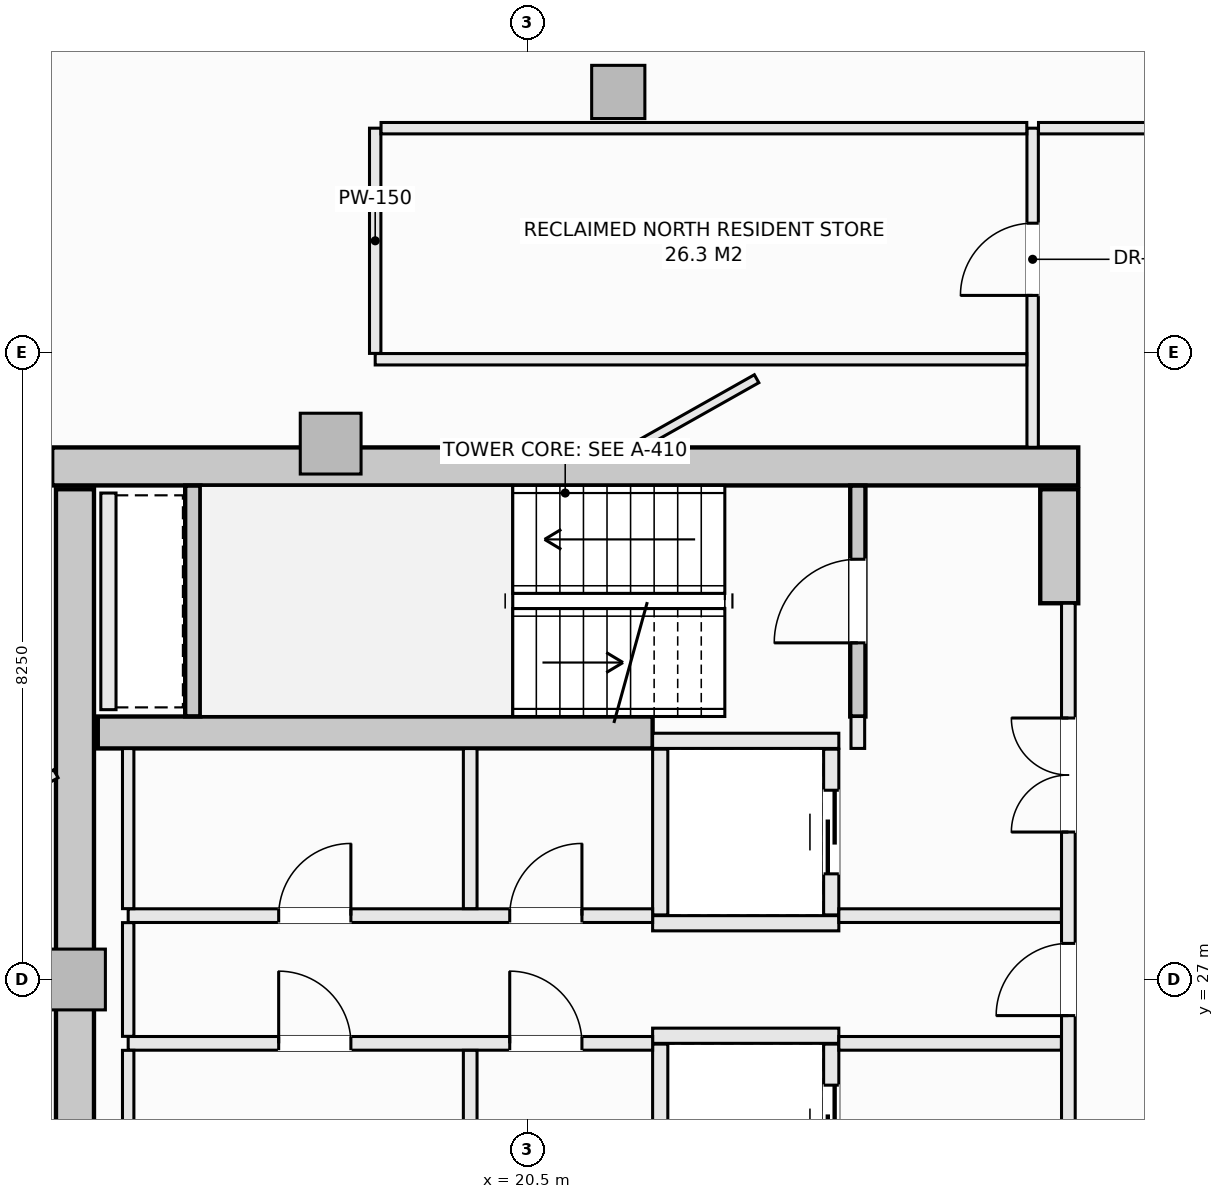
"""IFC4 building model, lengths in metres.
Left out: names, types, materials, properties, quantities, classifications, styles, units other than length and angle.
Written with IfcOpenShell. Run it as: python <this file> out.ifc"""

import sys

from ifc_helpers import new_model, si_unit, direction, frame, frame_2d, origin, origin_2d, place, context, subcontext, project, spatial, rectangle, extrude, element, fill, save


model = new_model("IFC4")
c1 = context("Model", 3, precision=1e-05, world=origin(), true_north=direction((0.0, 1.0)))
c2 = subcontext(c1, "Body", "Model", "MODEL_VIEW")
j1 = project(units=[si_unit("LENGTHUNIT", "METRE"), si_unit("PLANEANGLEUNIT", "RADIAN")], contexts=[c1])
p1 = place(None, origin())
s1 = spatial("IfcSite", under=j1, at=p1, CompositionType="ELEMENT")
p2 = place(p1, origin())
s2 = spatial("IfcBuilding", under=s1, at=p2, CompositionType="ELEMENT")
p3 = place(p2, frame((0.0, 0.0, 196.4)))
s3 = spatial("IfcBuildingStorey", under=s2, at=p3, CompositionType="ELEMENT", Elevation=196.4)
p4 = place(p3, frame((14.25, 33.75, -0.27), z_axis=(0.0, 0.0, 1.0), x_axis=(1.0, 0.0, 0.0)))
e1 = element("IfcWall", 1, at=p4, inside=s3, PredefinedType="SHEAR", context=c2, shape_type="SweptSolid", body=[
    extrude(rectangle(XDim=13.5, YDim=0.5, at=frame_2d((6.75, 0.0))), origin(), (0.0, 0.0, 1.0), 3.3),
])
p5 = place(p3, frame((14.55, 20.55, -0.27), z_axis=(0.0, 0.0, 1.0), x_axis=(0.0, 1.0, 0.0)))
e2 = element("IfcWall", 2, at=p5, inside=s3, PredefinedType="SHEAR", context=c2, shape_type="SweptSolid", body=[
    extrude(rectangle(XDim=12.9, YDim=0.5, at=frame_2d((6.45, 0.0))), origin(), (0.0, 0.0, 1.0), 3.3),
])
p6 = place(p3, frame((27.5, 31.95, -0.27), z_axis=(0.0, 0.0, 1.0), x_axis=(0.0, 1.0, 0.0)))
e3 = element("IfcWall", 3, at=p6, inside=s3, PredefinedType="SHEAR", context=c2, shape_type="SweptSolid", body=[
    extrude(rectangle(XDim=1.5, YDim=0.5, at=frame_2d((0.75, 0.0))), origin(), (0.0, 0.0, 1.0), 3.3),
])
p7 = place(p3, frame((14.85, 30.25, -0.27), z_axis=(0.0, 0.0, 1.0), x_axis=(1.0, 0.0, 0.0)))
e4 = element("IfcWall", 4, at=p7, inside=s3, PredefinedType="SHEAR", context=c2, shape_type="SweptSolid", body=[
    extrude(rectangle(XDim=7.3, YDim=0.42, at=frame_2d((3.65, 0.0))), origin(), (0.0, 0.0, 1.0), 3.3),
])
p8 = place(p3, frame((21.698, 38.677, -0.27), z_axis=(0.0, 0.0, 1.0), x_axis=(1.0, 0.0, 0.0)))
e5 = element("IfcColumn", 5, at=p8, inside=s3, PredefinedType="COLUMN", context=c2, shape_type="SweptSolid", body=[
    extrude(rectangle(XDim=0.7, YDim=0.7, at=origin_2d()), origin(), (0.0, 0.0, 1.0), 3.3),
])
for number, where, z_axis, x_axis in (
    (6, (17.914, 34.05, -0.27), (0.0, 0.0, 1.0), (1.0, 0.0, 0.0)),
    (7, (14.55, 27.0, -0.27), (0.0, 0.0, 1.0), (1.0, 0.0, 0.0)),
):
    element("IfcColumn", number, at=place(p3, frame(where, z_axis=z_axis, x_axis=x_axis)), inside=s3, PredefinedType="PILASTER", context=c2, shape_type="SweptSolid", body=[
        extrude(rectangle(XDim=0.8, YDim=0.8, at=origin_2d()), origin(), (0.0, 0.0, 1.0), 3.3),
    ])
p9 = place(p3, frame((24.85, 30.46, -0.27), z_axis=(0.0, 0.0, 1.0), x_axis=(0.0, 1.0, 0.0)))
e8 = element("IfcWall", 8, at=p9, inside=s3, PredefinedType="SHEAR", context=c2, shape_type="SweptSolid", body=[
    extrude(rectangle(XDim=3.038, YDim=0.2, at=frame_2d((1.519, 0.0))), origin(), (0.0, 0.0, 1.0), 3.3),
])
p10 = place(p9, frame((0.969, 0.0, 0.27)))
e9 = element("IfcOpeningElement", 9, at=p10, cuts=e8, PredefinedType="OPENING", context=c2, shape_type="SweptSolid", body=[
    extrude(rectangle(XDim=1.1, YDim=2.15, at=frame_2d((0.55, 1.075))), frame((0.0, 0.11, 0.0), z_axis=(0.0, -1.0, 0.0), x_axis=(1.0, 0.0, 0.0)), (0.0, 0.0, 1.0), 0.22),
])
p11 = place(p3, frame((16.1, 30.462, -0.27), z_axis=(0.0, 0.0, 1.0), x_axis=(0.0, 1.0, 0.0)))
e10 = element("IfcWall", 10, at=p11, inside=s3, PredefinedType="SHEAR", context=c2, shape_type="SweptSolid", body=[
    extrude(rectangle(XDim=3.036, YDim=0.2, at=frame_2d((1.518, 0.0))), origin(), (0.0, 0.0, 1.0), 3.3),
])
for number, where, z_axis, x_axis in (
    (11, (22.15, 30.14, 0.0), (0.0, 0.0, 1.0), (1.0, 0.0, 0.0)),
    (12, (22.15, 27.74, 0.0), (0.0, 0.0, 1.0), (1.0, 0.0, 0.0)),
):
    element("IfcWall", number, at=place(p3, frame(where, z_axis=z_axis, x_axis=x_axis)), inside=s3, PredefinedType="SOLIDWALL", context=c2, shape_type="SweptSolid", body=[
        extrude(rectangle(XDim=2.45, YDim=0.2, at=frame_2d((1.225, 0.0))), origin(), (0.0, 0.0, 1.0), 3.03),
    ])
p12 = place(p3, frame((22.25, 27.85, 0.0), z_axis=(0.0, 0.0, 1.0), x_axis=(0.0, 1.0, 0.0)))
e13 = element("IfcWall", 13, at=p12, inside=s3, PredefinedType="SOLIDWALL", context=c2, shape_type="SweptSolid", body=[
    extrude(rectangle(XDim=2.18, YDim=0.2, at=frame_2d((1.09, 0.0))), origin(), (0.0, 0.0, 1.0), 3.03),
])
p13 = place(p3, frame((24.5, 27.85, 0.0), z_axis=(0.0, 0.0, 1.0), x_axis=(0.0, 1.0, 0.0)))
e14 = element("IfcWall", 14, at=p13, inside=s3, PredefinedType="SOLIDWALL", context=c2, shape_type="SweptSolid", body=[
    extrude(rectangle(XDim=2.18, YDim=0.2, at=frame_2d((1.09, 0.0))), origin(), (0.0, 0.0, 1.0), 3.03),
])
p14 = place(p13, frame((0.54, 0.0, 0.0)))
e15 = element("IfcOpeningElement", 15, at=p14, cuts=e14, PredefinedType="OPENING", context=c2, shape_type="SweptSolid", body=[
    extrude(rectangle(XDim=1.1, YDim=2.2, at=frame_2d((0.55, 1.1))), frame((0.0, 0.11, 0.0), z_axis=(0.0, -1.0, 0.0), x_axis=(1.0, 0.0, 0.0)), (0.0, 0.0, 1.0), 0.22),
])
p15 = place(p3, frame((22.15, 26.26, 0.0), z_axis=(0.0, 0.0, 1.0), x_axis=(1.0, 0.0, 0.0)))
e16 = element("IfcWall", 16, at=p15, inside=s3, PredefinedType="SOLIDWALL", context=c2, shape_type="SweptSolid", body=[
    extrude(rectangle(XDim=2.45, YDim=0.2, at=frame_2d((1.225, 0.0))), origin(), (0.0, 0.0, 1.0), 3.03),
])
p16 = place(p3, frame((22.25, 23.97, 0.0), z_axis=(0.0, 0.0, 1.0), x_axis=(0.0, 1.0, 0.0)))
e17 = element("IfcWall", 17, at=p16, inside=s3, PredefinedType="SOLIDWALL", context=c2, shape_type="SweptSolid", body=[
    extrude(rectangle(XDim=2.18, YDim=0.2, at=frame_2d((1.09, 0.0))), origin(), (0.0, 0.0, 1.0), 3.03),
])
p17 = place(p3, frame((24.5, 23.97, 0.0), z_axis=(0.0, 0.0, 1.0), x_axis=(0.0, 1.0, 0.0)))
e18 = element("IfcWall", 18, at=p17, inside=s3, PredefinedType="SOLIDWALL", context=c2, shape_type="SweptSolid", body=[
    extrude(rectangle(XDim=2.18, YDim=0.2, at=frame_2d((1.09, 0.0))), origin(), (0.0, 0.0, 1.0), 3.03),
])
p18 = place(p17, frame((0.54, 0.0, 0.0)))
e19 = element("IfcOpeningElement", 19, at=p18, cuts=e18, PredefinedType="OPENING", context=c2, shape_type="SweptSolid", body=[
    extrude(rectangle(XDim=1.1, YDim=2.2, at=frame_2d((0.55, 1.1))), frame((0.0, 0.11, 0.0), z_axis=(0.0, -1.0, 0.0), x_axis=(1.0, 0.0, 0.0)), (0.0, 0.0, 1.0), 0.22),
])
p19 = place(p3, frame((14.99, 30.55, 0.0), z_axis=(0.0, 0.0, 1.0), x_axis=(0.0, 1.0, 0.0)))
e20 = element("IfcWall", 20, at=p19, inside=s3, PredefinedType="SOLIDWALL", context=c2, shape_type="SweptSolid", body=[
    extrude(rectangle(XDim=2.85, YDim=0.2, at=frame_2d((1.425, 0.0))), origin(), (0.0, 0.0, 1.0), 3.03),
])
p20 = place(p3, frame((24.85, 30.04, 0.0), z_axis=(0.0, 0.0, 1.0), x_axis=(0.0, 1.0, 0.0)))
e21 = element("IfcWall", 21, at=p20, inside=s3, PredefinedType="SOLIDWALL", context=c2, shape_type="SweptSolid", body=[
    extrude(rectangle(XDim=0.42, YDim=0.18, at=frame_2d((0.21, 0.0))), origin(), (0.0, 0.0, 1.0), 3.03),
])
p21 = place(p3, frame((27.62, 22.05, 0.0), z_axis=(0.0, 0.0, 1.0), x_axis=(0.0, 1.0, 0.0)))
e22 = element("IfcWall", 22, at=p21, inside=s3, PredefinedType="SOLIDWALL", context=c2, shape_type="SweptSolid", body=[
    extrude(rectangle(XDim=9.9, YDim=0.18, at=frame_2d((4.95, 0.0))), origin(), (0.0, 0.0, 1.0), 3.03),
])
p22 = place(p21, frame((4.475, 0.0, 0.0)))
e23 = element("IfcOpeningElement", 23, at=p22, cuts=e22, PredefinedType="OPENING", context=c2, shape_type="SweptSolid", body=[
    extrude(rectangle(XDim=0.95, YDim=2.1, at=frame_2d((0.475, 1.05))), frame((0.0, 0.1, 0.0), z_axis=(0.0, -1.0, 0.0), x_axis=(1.0, 0.0, 0.0)), (0.0, 0.0, 1.0), 0.2),
])
p23 = place(p21, frame((6.89, 0.0, 0.0)))
e24 = element("IfcOpeningElement", 24, at=p23, cuts=e22, PredefinedType="OPENING", context=c2, shape_type="SweptSolid", body=[
    extrude(rectangle(XDim=1.5, YDim=2.2, at=frame_2d((0.75, 1.1))), frame((0.0, 0.1, 0.0), z_axis=(0.0, -1.0, 0.0), x_axis=(1.0, 0.0, 0.0)), (0.0, 0.0, 1.0), 0.2),
])
p24 = place(p21, frame((1.51, 0.0, 0.0)))
e25 = element("IfcOpeningElement", 25, at=p24, cuts=e22, PredefinedType="OPENING", context=c2, shape_type="SweptSolid", body=[
    extrude(rectangle(XDim=1.5, YDim=2.2, at=frame_2d((0.75, 1.1))), frame((0.0, 0.1, 0.0), z_axis=(0.0, -1.0, 0.0), x_axis=(1.0, 0.0, 0.0)), (0.0, 0.0, 1.0), 0.2),
])
p25 = place(p3, frame((15.25, 27.84, 0.0), z_axis=(0.0, 0.0, 1.0), x_axis=(1.0, 0.0, 0.0)))
e26 = element("IfcWall", 26, at=p25, inside=s3, PredefinedType="SOLIDWALL", context=c2, shape_type="SweptSolid", body=[
    extrude(rectangle(XDim=6.9, YDim=0.18, at=frame_2d((3.45, 0.0))), origin(), (0.0, 0.0, 1.0), 3.03),
])
p26 = place(p25, frame((5.02, 0.0, 0.0)))
e27 = element("IfcOpeningElement", 27, at=p26, cuts=e26, PredefinedType="OPENING", context=c2, shape_type="SweptSolid", body=[
    extrude(rectangle(XDim=0.95, YDim=2.1, at=frame_2d((0.475, 1.05))), frame((0.0, 0.1, 0.0), z_axis=(0.0, -1.0, 0.0), x_axis=(1.0, 0.0, 0.0)), (0.0, 0.0, 1.0), 0.2),
])
p27 = place(p25, frame((1.98, 0.0, 0.0)))
e28 = element("IfcOpeningElement", 28, at=p27, cuts=e26, PredefinedType="OPENING", context=c2, shape_type="SweptSolid", body=[
    extrude(rectangle(XDim=0.95, YDim=2.1, at=frame_2d((0.475, 1.05))), frame((0.0, 0.1, 0.0), z_axis=(0.0, -1.0, 0.0), x_axis=(1.0, 0.0, 0.0)), (0.0, 0.0, 1.0), 0.2),
])
p28 = place(p3, frame((24.6, 27.84, 0.0), z_axis=(0.0, 0.0, 1.0), x_axis=(1.0, 0.0, 0.0)))
e29 = element("IfcWall", 29, at=p28, inside=s3, PredefinedType="SOLIDWALL", context=c2, shape_type="SweptSolid", body=[
    extrude(rectangle(XDim=2.928, YDim=0.18, at=frame_2d((1.464, 0.0))), origin(), (0.0, 0.0, 1.0), 3.03),
])
p29 = place(p3, frame((15.25, 26.16, 0.0), z_axis=(0.0, 0.0, 1.0), x_axis=(1.0, 0.0, 0.0)))
e30 = element("IfcWall", 30, at=p29, inside=s3, PredefinedType="SOLIDWALL", context=c2, shape_type="SweptSolid", body=[
    extrude(rectangle(XDim=6.9, YDim=0.18, at=frame_2d((3.45, 0.0))), origin(), (0.0, 0.0, 1.0), 3.03),
])
p30 = place(p29, frame((5.02, 0.0, 0.0)))
e31 = element("IfcOpeningElement", 31, at=p30, cuts=e30, PredefinedType="OPENING", context=c2, shape_type="SweptSolid", body=[
    extrude(rectangle(XDim=0.95, YDim=2.1, at=frame_2d((0.475, 1.05))), frame((0.0, 0.1, 0.0), z_axis=(0.0, -1.0, 0.0), x_axis=(1.0, 0.0, 0.0)), (0.0, 0.0, 1.0), 0.2),
])
p31 = place(p29, frame((1.98, 0.0, 0.0)))
e32 = element("IfcOpeningElement", 32, at=p31, cuts=e30, PredefinedType="OPENING", context=c2, shape_type="SweptSolid", body=[
    extrude(rectangle(XDim=0.95, YDim=2.1, at=frame_2d((0.475, 1.05))), frame((0.0, 0.1, 0.0), z_axis=(0.0, -1.0, 0.0), x_axis=(1.0, 0.0, 0.0)), (0.0, 0.0, 1.0), 0.2),
])
p32 = place(p3, frame((24.6, 26.16, 0.0), z_axis=(0.0, 0.0, 1.0), x_axis=(1.0, 0.0, 0.0)))
e33 = element("IfcWall", 33, at=p32, inside=s3, PredefinedType="SOLIDWALL", context=c2, shape_type="SweptSolid", body=[
    extrude(rectangle(XDim=2.928, YDim=0.18, at=frame_2d((1.464, 0.0))), origin(), (0.0, 0.0, 1.0), 3.03),
])
p33 = place(p3, frame((15.25, 23.962, 0.0), z_axis=(0.0, 0.0, 1.0), x_axis=(0.0, 1.0, 0.0)))
e34 = element("IfcWall", 34, at=p33, inside=s3, PredefinedType="PARTITIONING", context=c2, shape_type="SweptSolid", body=[
    extrude(rectangle(XDim=2.106, YDim=0.15, at=frame_2d((1.053, 0.0))), origin(), (0.0, 0.0, 1.0), 3.03),
])
p34 = place(p3, frame((15.25, 26.252, 0.0), z_axis=(0.0, 0.0, 1.0), x_axis=(0.0, 1.0, 0.0)))
e35 = element("IfcWall", 35, at=p34, inside=s3, PredefinedType="PARTITIONING", context=c2, shape_type="SweptSolid", body=[
    extrude(rectangle(XDim=1.496, YDim=0.15, at=frame_2d((0.748, 0.0))), origin(), (0.0, 0.0, 1.0), 3.03),
])
p35 = place(p3, frame((15.25, 27.932, 0.0), z_axis=(0.0, 0.0, 1.0), x_axis=(0.0, 1.0, 0.0)))
e36 = element("IfcWall", 36, at=p35, inside=s3, PredefinedType="PARTITIONING", context=c2, shape_type="SweptSolid", body=[
    extrude(rectangle(XDim=2.106, YDim=0.15, at=frame_2d((1.053, 0.0))), origin(), (0.0, 0.0, 1.0), 3.03),
])
for number, where, z_axis, x_axis in (
    (37, (19.75, 23.962, 0.0), (0.0, 0.0, 1.0), (0.0, 1.0, 0.0)),
    (38, (19.75, 27.932, 0.0), (0.0, 0.0, 1.0), (0.0, 1.0, 0.0)),
):
    element("IfcWall", number, at=place(p3, frame(where, z_axis=z_axis, x_axis=x_axis)), inside=s3, PredefinedType="SOLIDWALL", context=c2, shape_type="SweptSolid", body=[
        extrude(rectangle(XDim=2.106, YDim=0.18, at=frame_2d((1.053, 0.0))), origin(), (0.0, 0.0, 1.0), 3.03),
    ])
p36 = place(p3, frame((27.15, 34.002, 0.0), z_axis=(0.0, 0.0, 1.0), x_axis=(0.0, 1.0, 0.0)))
e39 = element("IfcWall", 39, at=p36, inside=s3, PredefinedType="PARTITIONING", context=c2, shape_type="SweptSolid", body=[
    extrude(rectangle(XDim=4.198, YDim=0.15, at=frame_2d((2.099, 0.0))), origin(), (0.0, 0.0, 1.0), 3.03),
])
p37 = place(p36, frame((1.998, 0.0, 0.0)))
e40 = element("IfcOpeningElement", 40, at=p37, cuts=e39, PredefinedType="OPENING", context=c2, shape_type="SweptSolid", body=[
    extrude(rectangle(XDim=0.95, YDim=2.1, at=frame_2d((0.475, 1.05))), frame((0.0, 0.085, 0.0), z_axis=(0.0, -1.0, 0.0), x_axis=(1.0, 0.0, 0.0)), (0.0, 0.0, 1.0), 0.17),
])
p38 = place(p3, frame((18.5, 35.16, 0.0), z_axis=(0.0, 0.0, 1.0), x_axis=(1.0, 0.0, 0.0)))
e41 = element("IfcWall", 41, at=p38, inside=s3, PredefinedType="PARTITIONING", context=c2, shape_type="SweptSolid", body=[
    extrude(rectangle(XDim=8.573, YDim=0.15, at=frame_2d((4.287, 0.0))), origin(), (0.0, 0.0, 1.0), 3.03),
])
p39 = place(p3, frame((18.5, 35.237, 0.0), z_axis=(0.0, 0.0, 1.0), x_axis=(0.0, 1.0, 0.0)))
e42 = element("IfcWall", 42, at=p39, inside=s3, PredefinedType="PARTITIONING", context=c2, shape_type="SweptSolid", body=[
    extrude(rectangle(XDim=2.963, YDim=0.15, at=frame_2d((1.481, 0.0))), origin(), (0.0, 0.0, 1.0), 3.03),
])
p40 = place(p3, frame((18.577, 38.2, 0.0), z_axis=(0.0, 0.0, 1.0), x_axis=(1.0, 0.0, 0.0)))
e43 = element("IfcWall", 43, at=p40, inside=s3, PredefinedType="PARTITIONING", context=c2, shape_type="SweptSolid", body=[
    extrude(rectangle(XDim=8.496, YDim=0.15, at=frame_2d((4.248, 0.0))), origin(), (0.0, 0.0, 1.0), 3.03),
])
p41 = place(p3, frame((27.227, 38.2, 0.0), z_axis=(0.0, 0.0, 1.0), x_axis=(1.0, 0.0, 0.0)))
e44 = element("IfcWall", 44, at=p41, inside=s3, PredefinedType="PARTITIONING", context=c2, shape_type="SweptSolid", body=[
    extrude(rectangle(XDim=2.958, YDim=0.15, at=frame_2d((1.479, 0.0))), origin(), (0.0, 0.0, 1.0), 3.03),
])
p42 = place(p3, frame((27.605, 41.395, 0.0), z_axis=(0.0, 0.0, 1.0), x_axis=(0.560433673257, -0.82819931048, 0.0)))
e45 = element("IfcWall", 45, at=p42, inside=s3, PredefinedType="PARTITIONING", context=c2, shape_type="SweptSolid", body=[
    extrude(rectangle(XDim=3.765, YDim=0.12, at=frame_2d((1.882, 0.0))), origin(), (0.0, 0.0, 1.0), 3.03),
])
p43 = place(p42, frame((1.407, 0.0, 0.0)))
e46 = element("IfcOpeningElement", 46, at=p43, cuts=e45, PredefinedType="OPENING", context=c2, shape_type="SweptSolid", body=[
    extrude(rectangle(XDim=0.95, YDim=2.1, at=frame_2d((0.475, 1.05))), frame((0.0, 0.07, 0.0), z_axis=(0.0, -1.0, 0.0), x_axis=(1.0, 0.0, 0.0)), (0.0, 0.0, 1.0), 0.14),
])
p44 = place(p3, frame((5.866, 24.954, 0.0), z_axis=(0.0, 0.0, 1.0), x_axis=(0.871135339325, 0.491042992597, 0.0)))
e47 = element("IfcWall", 47, at=p44, inside=s3, PredefinedType="PARTITIONING", context=c2, shape_type="SweptSolid", body=[
    extrude(rectangle(XDim=9.68, YDim=0.12, at=frame_2d((4.84, 0.0))), origin(), (0.0, 0.0, 1.0), 2.478),
])
p45 = place(p3, frame((21.918, 34.002, 0.0), z_axis=(0.0, 0.0, 1.0), x_axis=(0.871124293407, 0.491062588104, 0.0)))
e48 = element("IfcWall", 48, at=p45, inside=s3, PredefinedType="PARTITIONING", context=c2, shape_type="SweptSolid", body=[
    extrude(rectangle(XDim=1.836, YDim=0.12, at=frame_2d((0.918, 0.0))), origin(), (0.0, 0.0, 1.0), 3.03),
])
p46 = place(p10, origin())
e49 = element("IfcDoor", 49, at=p46, inside=s3, OperationType="SINGLE_SWING_LEFT", PredefinedType="DOOR", context=c2, shape_type="SweptSolid", body=[
    extrude(rectangle(XDim=1.1, YDim=2.15, at=frame_2d((0.55, 1.075))), frame((0.0, 0.025, 0.0), z_axis=(0.0, -1.0, 0.0), x_axis=(1.0, 0.0, 0.0)), (0.0, 0.0, 1.0), 0.05),
])
fill(e9, e49)
p47 = place(p14, origin())
e50 = element("IfcDoor", 50, at=p47, inside=s3, OperationType="SLIDING_TO_LEFT", PredefinedType="DOOR", context=c2, shape_type="SweptSolid", body=[
    extrude(rectangle(XDim=1.1, YDim=2.2, at=frame_2d((0.55, 1.1))), frame((0.0, 0.025, 0.0), z_axis=(0.0, -1.0, 0.0), x_axis=(1.0, 0.0, 0.0)), (0.0, 0.0, 1.0), 0.05),
])
fill(e15, e50)
p48 = place(p18, origin())
e51 = element("IfcDoor", 51, at=p48, inside=s3, OperationType="SLIDING_TO_LEFT", PredefinedType="DOOR", context=c2, shape_type="SweptSolid", body=[
    extrude(rectangle(XDim=1.1, YDim=2.2, at=frame_2d((0.55, 1.1))), frame((0.0, 0.025, 0.0), z_axis=(0.0, -1.0, 0.0), x_axis=(1.0, 0.0, 0.0)), (0.0, 0.0, 1.0), 0.05),
])
fill(e19, e51)
p49 = place(p22, origin())
e52 = element("IfcDoor", 52, at=p49, inside=s3, OperationType="SINGLE_SWING_LEFT", PredefinedType="DOOR", context=c2, shape_type="SweptSolid", body=[
    extrude(rectangle(XDim=0.95, YDim=2.1, at=frame_2d((0.475, 1.05))), frame((0.0, 0.025, 0.0), z_axis=(0.0, -1.0, 0.0), x_axis=(1.0, 0.0, 0.0)), (0.0, 0.0, 1.0), 0.05),
])
fill(e23, e52)
p50 = place(p23, origin())
e53 = element("IfcDoor", 53, at=p50, inside=s3, OperationType="DOUBLE_DOOR_SINGLE_SWING", PredefinedType="DOOR", context=c2, shape_type="SweptSolid", body=[
    extrude(rectangle(XDim=1.5, YDim=2.2, at=frame_2d((0.75, 1.1))), frame((0.0, 0.025, 0.0), z_axis=(0.0, -1.0, 0.0), x_axis=(1.0, 0.0, 0.0)), (0.0, 0.0, 1.0), 0.05),
])
fill(e24, e53)
p51 = place(p26, origin())
e54 = element("IfcDoor", 54, at=p51, inside=s3, OperationType="SINGLE_SWING_RIGHT", PredefinedType="DOOR", context=c2, shape_type="SweptSolid", body=[
    extrude(rectangle(XDim=0.95, YDim=2.1, at=frame_2d((0.475, 1.05))), frame((0.0, 0.025, 0.0), z_axis=(0.0, -1.0, 0.0), x_axis=(1.0, 0.0, 0.0)), (0.0, 0.0, 1.0), 0.05),
])
fill(e27, e54)
p52 = place(p30, origin())
e55 = element("IfcDoor", 55, at=p52, inside=s3, OperationType="SINGLE_SWING_LEFT", PredefinedType="DOOR", context=c2, shape_type="SweptSolid", body=[
    extrude(rectangle(XDim=0.95, YDim=2.1, at=frame_2d((0.475, 1.05))), frame((0.0, 0.025, 0.0), z_axis=(0.0, -1.0, 0.0), x_axis=(1.0, 0.0, 0.0)), (0.0, 0.0, 1.0), 0.05),
])
fill(e31, e55)
p53 = place(p27, origin())
e56 = element("IfcDoor", 56, at=p53, inside=s3, OperationType="SINGLE_SWING_RIGHT", PredefinedType="DOOR", context=c2, shape_type="SweptSolid", body=[
    extrude(rectangle(XDim=0.95, YDim=2.1, at=frame_2d((0.475, 1.05))), frame((0.0, 0.025, 0.0), z_axis=(0.0, -1.0, 0.0), x_axis=(1.0, 0.0, 0.0)), (0.0, 0.0, 1.0), 0.05),
])
fill(e28, e56)
p54 = place(p31, origin())
e57 = element("IfcDoor", 57, at=p54, inside=s3, OperationType="SINGLE_SWING_LEFT", PredefinedType="DOOR", context=c2, shape_type="SweptSolid", body=[
    extrude(rectangle(XDim=0.95, YDim=2.1, at=frame_2d((0.475, 1.05))), frame((0.0, 0.025, 0.0), z_axis=(0.0, -1.0, 0.0), x_axis=(1.0, 0.0, 0.0)), (0.0, 0.0, 1.0), 0.05),
])
fill(e32, e57)
p55 = place(p37, origin())
e58 = element("IfcDoor", 58, at=p55, inside=s3, OperationType="SINGLE_SWING_LEFT", PredefinedType="DOOR", context=c2, shape_type="SweptSolid", body=[
    extrude(rectangle(XDim=0.95, YDim=2.1, at=frame_2d((0.475, 1.05))), frame((0.0, 0.025, 0.0), z_axis=(0.0, -1.0, 0.0), x_axis=(1.0, 0.0, 0.0)), (0.0, 0.0, 1.0), 0.05),
])
fill(e40, e58)
save(model, sys.argv[1])
